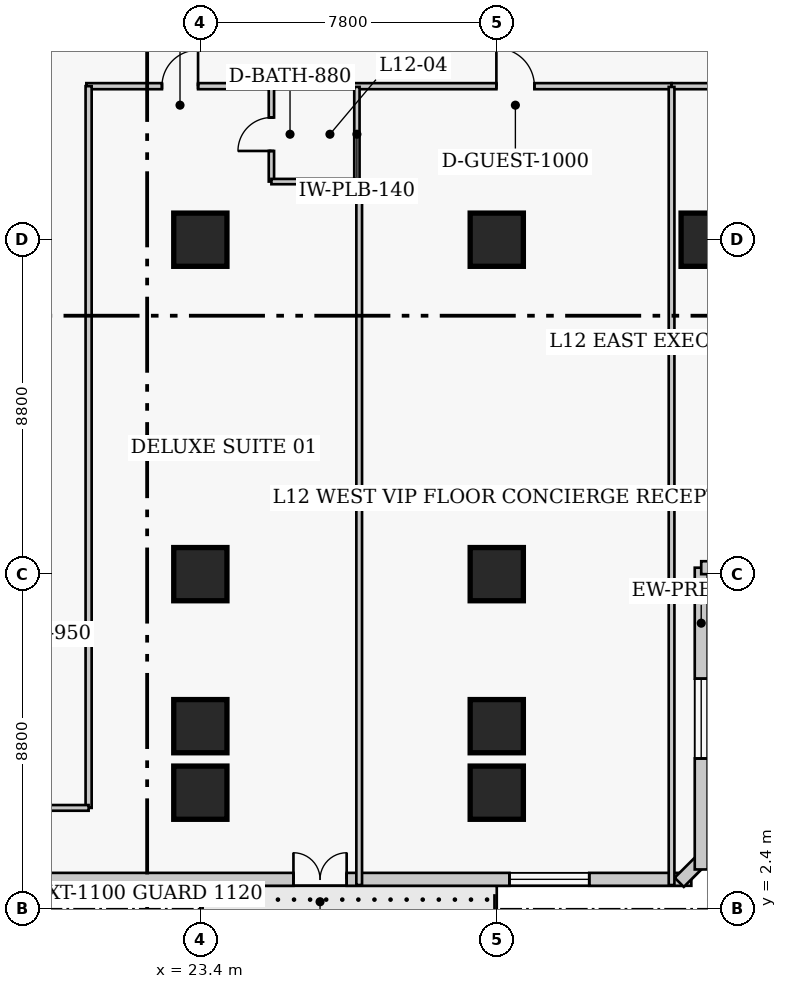
"""IFC4 building model, lengths in metres.
Left out: names, types, materials, properties, quantities, classifications, styles, units other than length and angle.
Written with IfcOpenShell. Run it as: python <this file> out.ifc"""

import sys

from ifc_helpers import new_model, si_unit, direction, frame, frame_2d, origin, origin_2d, place, context, subcontext, project, spatial, rectangle, extrude, element, fill, save


model = new_model("IFC4")
c1 = context("Model", 3, precision=1e-05, world=origin(), true_north=direction((0.0, 1.0)))
c2 = subcontext(c1, "Body", "Model", "MODEL_VIEW")
j1 = project(units=[si_unit("LENGTHUNIT", "METRE"), si_unit("PLANEANGLEUNIT", "RADIAN")], contexts=[c1])
p1 = place(None, origin())
s1 = spatial("IfcSite", under=j1, at=p1, CompositionType="ELEMENT")
p2 = place(p1, origin())
s2 = spatial("IfcBuilding", under=s1, at=p2, CompositionType="ELEMENT")
p3 = place(p2, frame((0.0, 0.0, 52.6)))
s3 = spatial("IfcBuildingStorey", under=s2, at=p3, CompositionType="ELEMENT", Elevation=52.6)
for number, where, z_axis, x_axis in (
    (1, (23.4, 11.2, 0.0), (0.0, 0.0, 1.0), (1.0, 0.0, 0.0)),
    (2, (23.4, 20.0, 0.0), (0.0, 0.0, 1.0), (1.0, 0.0, 0.0)),
    (3, (31.2, 11.2, 0.0), (0.0, 0.0, 1.0), (1.0, 0.0, 0.0)),
    (4, (31.2, 20.0, 0.0), (0.0, 0.0, 1.0), (1.0, 0.0, 0.0)),
    (5, (36.75, 20.0, 0.0), (0.0, 0.0, 1.0), (1.0, 0.0, 0.0)),
    (6, (23.4, 7.2, 0.0), (0.0, 0.0, 1.0), (1.0, 0.0, 0.0)),
    (7, (31.2, 7.2, 0.0), (0.0, 0.0, 1.0), (1.0, 0.0, 0.0)),
    (8, (23.4, 5.45, 0.0), (0.0, 0.0, 1.0), (1.0, 0.0, 0.0)),
    (9, (31.2, 5.45, 0.0), (0.0, 0.0, 1.0), (1.0, 0.0, 0.0)),
):
    element("IfcColumn", number, at=place(p3, frame(where, z_axis=z_axis, x_axis=x_axis)), inside=s3, PredefinedType="COLUMN", context=c2, shape_type="SweptSolid", body=[
        extrude(rectangle(XDim=1.4, YDim=1.4, at=origin_2d()), origin(), (0.0, 0.0, 1.0), 3.8),
    ])
p4 = place(p3, frame((6.43, 3.17, 0.0), z_axis=(0.0, 0.0, 1.0), x_axis=(1.0, 0.0, 0.0)))
e10 = element("IfcWall", 10, at=p4, inside=s3, PredefinedType="SOLIDWALL", context=c2, shape_type="SweptSolid", body=[
    extrude(rectangle(XDim=29.89, YDim=0.34, at=frame_2d((14.945, 0.0))), origin(), (0.0, 0.0, 1.0), 3.54),
])
p5 = place(p4, frame((19.42, 0.0, 0.0)))
e11 = element("IfcOpeningElement", 11, at=p5, cuts=e10, PredefinedType="OPENING", context=c2, shape_type="SweptSolid", body=[
    extrude(rectangle(XDim=1.4, YDim=2.15, at=frame_2d((0.7, 1.075))), frame((0.0, 0.18, 0.0), z_axis=(0.0, -1.0, 0.0), x_axis=(1.0, 0.0, 0.0)), (0.0, 0.0, 1.0), 0.36),
])
p6 = place(p4, frame((2.686, 0.0, 0.85)))
e12 = element("IfcOpeningElement", 12, at=p6, cuts=e10, PredefinedType="OPENING", context=c2, shape_type="SweptSolid", body=[
    extrude(rectangle(XDim=2.1, YDim=1.85, at=frame_2d((1.05, 0.925))), frame((0.0, 0.18, 0.0), z_axis=(0.0, -1.0, 0.0), x_axis=(1.0, 0.0, 0.0)), (0.0, 0.0, 1.0), 0.36),
])
p7 = place(p4, frame((9.009, 0.0, 0.85)))
e13 = element("IfcOpeningElement", 13, at=p7, cuts=e10, PredefinedType="OPENING", context=c2, shape_type="SweptSolid", body=[
    extrude(rectangle(XDim=2.1, YDim=1.85, at=frame_2d((1.05, 0.925))), frame((0.0, 0.18, 0.0), z_axis=(0.0, -1.0, 0.0), x_axis=(1.0, 0.0, 0.0)), (0.0, 0.0, 1.0), 0.36),
])
p8 = place(p4, frame((25.104, 0.0, 0.85)))
e14 = element("IfcOpeningElement", 14, at=p8, cuts=e10, PredefinedType="OPENING", context=c2, shape_type="SweptSolid", body=[
    extrude(rectangle(XDim=2.1, YDim=1.85, at=frame_2d((1.05, 0.925))), frame((0.0, 0.18, 0.0), z_axis=(0.0, -1.0, 0.0), x_axis=(1.0, 0.0, 0.0)), (0.0, 0.0, 1.0), 0.36),
])
p9 = place(p3, frame((36.001, 3.092, 0.0), z_axis=(0.0, 0.0, 1.0), x_axis=(0.707106781187, 0.707106781187, 0.0)))
e15 = element("IfcWall", 15, at=p9, inside=s3, PredefinedType="SOLIDWALL", context=c2, shape_type="SweptSolid", body=[
    extrude(rectangle(XDim=0.929, YDim=0.34, at=frame_2d((0.464, 0.0))), origin(), (0.0, 0.0, 1.0), 3.54),
])
p10 = place(p3, frame((36.58, 3.43, 0.0), z_axis=(0.0, 0.0, 1.0), x_axis=(0.0, 1.0, 0.0)))
e16 = element("IfcWall", 16, at=p10, inside=s3, PredefinedType="SOLIDWALL", context=c2, shape_type="SweptSolid", body=[
    extrude(rectangle(XDim=7.94, YDim=0.34, at=frame_2d((3.97, 0.0))), origin(), (0.0, 0.0, 1.0), 3.54),
])
p11 = place(p10, frame((2.92, 0.0, 0.85)))
e17 = element("IfcOpeningElement", 17, at=p11, cuts=e16, PredefinedType="OPENING", context=c2, shape_type="SweptSolid", body=[
    extrude(rectangle(XDim=2.1, YDim=1.85, at=frame_2d((1.05, 0.925))), frame((0.0, 0.18, 0.0), z_axis=(0.0, -1.0, 0.0), x_axis=(1.0, 0.0, 0.0)), (0.0, 0.0, 1.0), 0.36),
])
p12 = place(p3, frame((36.58, 11.37, 0.0), z_axis=(0.0, 0.0, 1.0), x_axis=(1.0, 0.0, 0.0)))
e18 = element("IfcWall", 18, at=p12, inside=s3, PredefinedType="SOLIDWALL", context=c2, shape_type="SweptSolid", body=[
    extrude(rectangle(XDim=4.84, YDim=0.34, at=frame_2d((2.42, 0.0))), origin(), (0.0, 0.0, 1.0), 3.54),
])
p13 = place(p12, frame((1.37, 0.0, 0.85)))
e19 = element("IfcOpeningElement", 19, at=p13, cuts=e18, PredefinedType="OPENING", context=c2, shape_type="SweptSolid", body=[
    extrude(rectangle(XDim=2.1, YDim=1.85, at=frame_2d((1.05, 0.925))), frame((0.0, 0.18, 0.0), z_axis=(0.0, -1.0, 0.0), x_axis=(1.0, 0.0, 0.0)), (0.0, 0.0, 1.0), 0.36),
])
p14 = place(p3, frame((20.4, 24.04, 0.0), z_axis=(0.0, 0.0, 1.0), x_axis=(1.0, 0.0, 0.0)))
e20 = element("IfcWall", 20, at=p14, inside=s3, PredefinedType="PARTITIONING", context=c2, shape_type="SweptSolid", body=[
    extrude(rectangle(XDim=15.4, YDim=0.16, at=frame_2d((7.7, 0.0))), origin(), (0.0, 0.0, 1.0), 3.54),
])
p15 = place(p14, frame((1.99, 0.0, 0.0)))
e21 = element("IfcOpeningElement", 21, at=p15, cuts=e20, PredefinedType="OPENING", context=c2, shape_type="SweptSolid", body=[
    extrude(rectangle(XDim=0.95, YDim=2.1, at=frame_2d((0.475, 1.05))), frame((0.0, 0.09, 0.0), z_axis=(0.0, -1.0, 0.0), x_axis=(1.0, 0.0, 0.0)), (0.0, 0.0, 1.0), 0.18),
])
p16 = place(p14, frame((10.79, 0.0, 0.0)))
e22 = element("IfcOpeningElement", 22, at=p16, cuts=e20, PredefinedType="OPENING", context=c2, shape_type="SweptSolid", body=[
    extrude(rectangle(XDim=1.0, YDim=2.15, at=frame_2d((0.5, 1.075))), frame((0.0, 0.09, 0.0), z_axis=(0.0, -1.0, 0.0), x_axis=(1.0, 0.0, 0.0)), (0.0, 0.0, 1.0), 0.18),
])
p17 = place(p3, frame((35.8, 24.04, 0.0), z_axis=(0.0, 0.0, 1.0), x_axis=(1.0, 0.0, 0.0)))
e23 = element("IfcWall", 23, at=p17, inside=s3, PredefinedType="PARTITIONING", context=c2, shape_type="SweptSolid", body=[
    extrude(rectangle(XDim=23.5, YDim=0.16, at=frame_2d((11.75, 0.0))), origin(), (0.0, 0.0, 1.0), 3.54),
])
p18 = place(p17, frame((2.705, 0.0, 0.0)))
e24 = element("IfcOpeningElement", 24, at=p18, cuts=e23, PredefinedType="OPENING", context=c2, shape_type="SweptSolid", body=[
    extrude(rectangle(XDim=1.0, YDim=2.15, at=frame_2d((0.5, 1.075))), frame((0.0, 0.09, 0.0), z_axis=(0.0, -1.0, 0.0), x_axis=(1.0, 0.0, 0.0)), (0.0, 0.0, 1.0), 0.18),
])
p19 = place(p17, frame((10.02, 0.0, 0.0)))
e25 = element("IfcOpeningElement", 25, at=p19, cuts=e23, PredefinedType="OPENING", context=c2, shape_type="SweptSolid", body=[
    extrude(rectangle(XDim=0.95, YDim=2.1, at=frame_2d((0.475, 1.05))), frame((0.0, 0.09, 0.0), z_axis=(0.0, -1.0, 0.0), x_axis=(1.0, 0.0, 0.0)), (0.0, 0.0, 1.0), 0.18),
])
p20 = place(p17, frame((15.88, 0.0, 0.0)))
e26 = element("IfcOpeningElement", 26, at=p20, cuts=e23, PredefinedType="OPENING", context=c2, shape_type="SweptSolid", body=[
    extrude(rectangle(XDim=0.95, YDim=2.1, at=frame_2d((0.475, 1.05))), frame((0.0, 0.09, 0.0), z_axis=(0.0, -1.0, 0.0), x_axis=(1.0, 0.0, 0.0)), (0.0, 0.0, 1.0), 0.18),
])
p21 = place(p17, frame((19.155, 0.0, 0.0)))
e27 = element("IfcOpeningElement", 27, at=p21, cuts=e23, PredefinedType="OPENING", context=c2, shape_type="SweptSolid", body=[
    extrude(rectangle(XDim=0.95, YDim=2.1, at=frame_2d((0.475, 1.05))), frame((0.0, 0.09, 0.0), z_axis=(0.0, -1.0, 0.0), x_axis=(1.0, 0.0, 0.0)), (0.0, 0.0, 1.0), 0.18),
])
p22 = place(p3, frame((20.46, 5.05, 0.0), z_axis=(0.0, 0.0, 1.0), x_axis=(0.0, 1.0, 0.0)))
e28 = element("IfcWall", 28, at=p22, inside=s3, PredefinedType="PARTITIONING", context=c2, shape_type="SweptSolid", body=[
    extrude(rectangle(XDim=18.99, YDim=0.16, at=frame_2d((9.495, 0.0))), origin(), (0.0, 0.0, 1.0), 3.54),
])
p23 = place(p3, frame((18.24, 5.05, 0.0), z_axis=(0.0, 0.0, 1.0), x_axis=(1.0, 0.0, 0.0)))
e29 = element("IfcWall", 29, at=p23, inside=s3, PredefinedType="PARTITIONING", context=c2, shape_type="SweptSolid", body=[
    extrude(rectangle(XDim=2.22, YDim=0.15, at=frame_2d((1.11, 0.0))), origin(), (0.0, 0.0, 1.0), 3.54),
])
p24 = place(p3, frame((25.27, 21.53, 0.0), z_axis=(0.0, 0.0, 1.0), x_axis=(0.0, 1.0, 0.0)))
e30 = element("IfcWall", 30, at=p24, inside=s3, PredefinedType="PLUMBINGWALL", context=c2, shape_type="SweptSolid", body=[
    extrude(rectangle(XDim=2.49, YDim=0.14, at=frame_2d((1.245, 0.0))), origin(), (0.0, 0.0, 1.0), 3.54),
])
p25 = place(p24, frame((0.805, 0.0, 0.0)))
e31 = element("IfcOpeningElement", 31, at=p25, cuts=e30, PredefinedType="OPENING", context=c2, shape_type="SweptSolid", body=[
    extrude(rectangle(XDim=0.88, YDim=2.05, at=frame_2d((0.44, 1.025))), frame((0.0, 0.08, 0.0), z_axis=(0.0, -1.0, 0.0), x_axis=(1.0, 0.0, 0.0)), (0.0, 0.0, 1.0), 0.16),
])
p26 = place(p3, frame((27.52, 21.53, 0.0), z_axis=(0.0, 0.0, 1.0), x_axis=(0.0, 1.0, 0.0)))
e32 = element("IfcWall", 32, at=p26, inside=s3, PredefinedType="PLUMBINGWALL", context=c2, shape_type="SweptSolid", body=[
    extrude(rectangle(XDim=2.49, YDim=0.14, at=frame_2d((1.245, 0.0))), origin(), (0.0, 0.0, 1.0), 3.54),
])
p27 = place(p3, frame((25.27, 21.53, 0.0), z_axis=(0.0, 0.0, 1.0), x_axis=(1.0, 0.0, 0.0)))
e33 = element("IfcWall", 33, at=p27, inside=s3, PredefinedType="PLUMBINGWALL", context=c2, shape_type="SweptSolid", body=[
    extrude(rectangle(XDim=2.25, YDim=0.14, at=frame_2d((1.125, 0.0))), origin(), (0.0, 0.0, 1.0), 3.54),
])
p28 = place(p3, frame((27.58, 3.02, 0.0), z_axis=(0.0, 0.0, 1.0), x_axis=(0.0, 1.0, 0.0)))
e34 = element("IfcWall", 34, at=p28, inside=s3, PredefinedType="PARTITIONING", context=c2, shape_type="SweptSolid", body=[
    extrude(rectangle(XDim=18.51, YDim=0.15, at=frame_2d((9.255, 0.0))), origin(), (0.0, 0.0, 1.0), 3.54),
])
p29 = place(p3, frame((35.8, 3.02, 0.0), z_axis=(0.0, 0.0, 1.0), x_axis=(0.0, 1.0, 0.0)))
e35 = element("IfcWall", 35, at=p29, inside=s3, PredefinedType="PARTITIONING", context=c2, shape_type="SweptSolid", body=[
    extrude(rectangle(XDim=21.0, YDim=0.15, at=frame_2d((10.5, 0.0))), origin(), (0.0, 0.0, 1.0), 3.54),
])
p30 = place(p5, origin())
e36 = element("IfcDoor", 36, at=p30, inside=s3, OperationType="DOUBLE_DOOR_SINGLE_SWING", PredefinedType="DOOR", context=c2, shape_type="SweptSolid", body=[
    extrude(rectangle(XDim=1.4, YDim=2.15, at=frame_2d((0.7, 1.075))), frame((0.0, 0.025, 0.0), z_axis=(0.0, -1.0, 0.0), x_axis=(1.0, 0.0, 0.0)), (0.0, 0.0, 1.0), 0.05),
])
fill(e11, e36)
p31 = place(p8, origin())
e37 = element("IfcWindow", 37, at=p31, inside=s3, PartitioningType="SINGLE_PANEL", PredefinedType="WINDOW", context=c2, shape_type="SweptSolid", body=[
    extrude(rectangle(XDim=2.1, YDim=1.85, at=frame_2d((1.05, 0.925))), frame((0.0, 0.03, 0.0), z_axis=(0.0, -1.0, 0.0), x_axis=(1.0, 0.0, 0.0)), (0.0, 0.0, 1.0), 0.06),
])
fill(e14, e37)
p32 = place(p11, origin())
e38 = element("IfcWindow", 38, at=p32, inside=s3, PartitioningType="SINGLE_PANEL", PredefinedType="WINDOW", context=c2, shape_type="SweptSolid", body=[
    extrude(rectangle(XDim=2.1, YDim=1.85, at=frame_2d((1.05, 0.925))), frame((0.0, 0.03, 0.0), z_axis=(0.0, -1.0, 0.0), x_axis=(1.0, 0.0, 0.0)), (0.0, 0.0, 1.0), 0.06),
])
fill(e17, e38)
p33 = place(p25, origin())
e39 = element("IfcDoor", 39, at=p33, inside=s3, OperationType="SINGLE_SWING_LEFT", PredefinedType="DOOR", context=c2, shape_type="SweptSolid", body=[
    extrude(rectangle(XDim=0.88, YDim=2.05, at=frame_2d((0.44, 1.025))), frame((0.0, 0.025, 0.0), z_axis=(0.0, -1.0, 0.0), x_axis=(1.0, 0.0, 0.0)), (0.0, 0.0, 1.0), 0.05),
])
fill(e31, e39)
p34 = place(p15, origin())
e40 = element("IfcDoor", 40, at=p34, inside=s3, OperationType="SINGLE_SWING_RIGHT", PredefinedType="DOOR", context=c2, shape_type="SweptSolid", body=[
    extrude(rectangle(XDim=0.95, YDim=2.1, at=frame_2d((0.475, 1.05))), frame((0.0, 0.025, 0.0), z_axis=(0.0, -1.0, 0.0), x_axis=(1.0, 0.0, 0.0)), (0.0, 0.0, 1.0), 0.05),
])
fill(e21, e40)
p35 = place(p16, origin())
e41 = element("IfcDoor", 41, at=p35, inside=s3, OperationType="SINGLE_SWING_LEFT", PredefinedType="DOOR", context=c2, shape_type="SweptSolid", body=[
    extrude(rectangle(XDim=1.0, YDim=2.15, at=frame_2d((0.5, 1.075))), frame((0.0, 0.025, 0.0), z_axis=(0.0, -1.0, 0.0), x_axis=(1.0, 0.0, 0.0)), (0.0, 0.0, 1.0), 0.05),
])
fill(e22, e41)
save(model, sys.argv[1])
